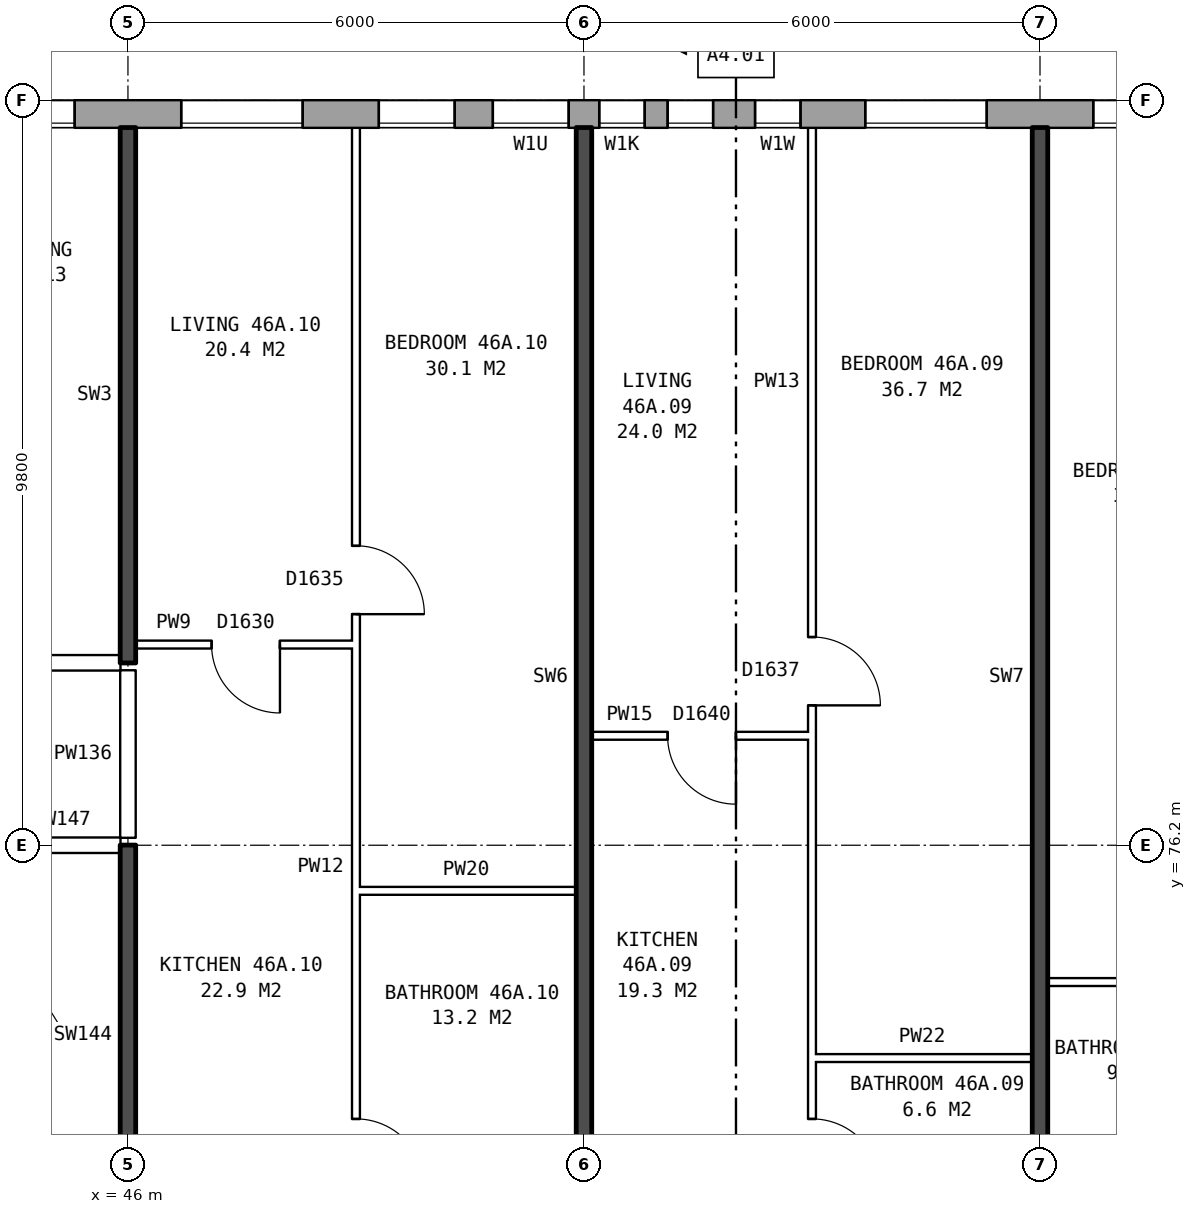
"""IFC4 building model, lengths in metres.
Left out: names, types, materials, properties, quantities, classifications, styles, units other than length and angle.
Written with IfcOpenShell. Run it as: python <this file> out.ifc"""

import sys

from ifc_helpers import new_model, si_unit, direction, frame, frame_2d, origin, place, context, subcontext, project, spatial, rectangle, extrude, element, fill, save


model = new_model("IFC4")
c1 = context("Model", 3, precision=1e-05, world=origin(), true_north=direction((0.0, 1.0)))
c2 = subcontext(c1, "Body", "Model", "MODEL_VIEW")
j1 = project(units=[si_unit("LENGTHUNIT", "METRE"), si_unit("PLANEANGLEUNIT", "RADIAN")], contexts=[c1])
p1 = place(None, origin())
s1 = spatial("IfcSite", under=j1, at=p1, CompositionType="ELEMENT")
p2 = place(p1, origin())
s2 = spatial("IfcBuilding", under=s1, at=p2, CompositionType="ELEMENT")
p3 = place(p2, frame((0.0, 0.0, 164.0)))
s3 = spatial("IfcBuildingStorey", under=s2, at=p3, CompositionType="ELEMENT", Elevation=164.0)
p4 = place(p3, frame((72.925, 85.82, 0.0), z_axis=(0.0, 0.0, 1.0), x_axis=(-1.0, 0.0, 0.0)))
e1 = element("IfcWall", 1, at=p4, inside=s3, PredefinedType="STANDARD", context=c2, shape_type="SweptSolid", body=[
    extrude(rectangle(XDim=41.351, YDim=0.36, at=frame_2d((20.675, 0.0))), origin(), (0.0, 0.0, 1.0), 2.85),
])
p5 = place(p4, frame((0.625, 0.0, 0.8)))
e2 = element("IfcOpeningElement", 2, at=p5, cuts=e1, PredefinedType="OPENING", context=c2, shape_type="SweptSolid", body=[
    extrude(rectangle(XDim=1.6, YDim=1.8, at=frame_2d((0.8, 0.9))), frame((0.0, 0.19, 0.0), z_axis=(0.0, -1.0, 0.0), x_axis=(1.0, 0.0, 0.0)), (0.0, 0.0, 1.0), 0.38),
])
p6 = place(p4, frame((3.625, 0.0, 0.8)))
e3 = element("IfcOpeningElement", 3, at=p6, cuts=e1, PredefinedType="OPENING", context=c2, shape_type="SweptSolid", body=[
    extrude(rectangle(XDim=1.6, YDim=1.8, at=frame_2d((0.8, 0.9))), frame((0.0, 0.19, 0.0), z_axis=(0.0, -1.0, 0.0), x_axis=(1.0, 0.0, 0.0)), (0.0, 0.0, 1.0), 0.38),
])
p7 = place(p4, frame((6.625, 0.0, 0.8)))
e4 = element("IfcOpeningElement", 4, at=p7, cuts=e1, PredefinedType="OPENING", context=c2, shape_type="SweptSolid", body=[
    extrude(rectangle(XDim=1.6, YDim=1.8, at=frame_2d((0.8, 0.9))), frame((0.0, 0.19, 0.0), z_axis=(0.0, -1.0, 0.0), x_axis=(1.0, 0.0, 0.0)), (0.0, 0.0, 1.0), 0.38),
])
p8 = place(p4, frame((9.625, 0.0, 0.8)))
e5 = element("IfcOpeningElement", 5, at=p8, cuts=e1, PredefinedType="OPENING", context=c2, shape_type="SweptSolid", body=[
    extrude(rectangle(XDim=1.6, YDim=1.8, at=frame_2d((0.8, 0.9))), frame((0.0, 0.19, 0.0), z_axis=(0.0, -1.0, 0.0), x_axis=(1.0, 0.0, 0.0)), (0.0, 0.0, 1.0), 0.38),
])
p9 = place(p4, frame((12.625, 0.0, 0.8)))
e6 = element("IfcOpeningElement", 6, at=p9, cuts=e1, PredefinedType="OPENING", context=c2, shape_type="SweptSolid", body=[
    extrude(rectangle(XDim=1.6, YDim=1.8, at=frame_2d((0.8, 0.9))), frame((0.0, 0.19, 0.0), z_axis=(0.0, -1.0, 0.0), x_axis=(1.0, 0.0, 0.0)), (0.0, 0.0, 1.0), 0.38),
])
p10 = place(p4, frame((15.625, 0.0, 0.8)))
e7 = element("IfcOpeningElement", 7, at=p10, cuts=e1, PredefinedType="OPENING", context=c2, shape_type="SweptSolid", body=[
    extrude(rectangle(XDim=1.6, YDim=1.8, at=frame_2d((0.8, 0.9))), frame((0.0, 0.19, 0.0), z_axis=(0.0, -1.0, 0.0), x_axis=(1.0, 0.0, 0.0)), (0.0, 0.0, 1.0), 0.38),
])
p11 = place(p4, frame((18.075, 0.0, 1.65)))
e8 = element("IfcOpeningElement", 8, at=p11, cuts=e1, PredefinedType="OPENING", context=c2, shape_type="SweptSolid", body=[
    extrude(rectangle(XDim=0.6, YDim=0.9, at=frame_2d((0.3, 0.45))), frame((0.0, 0.19, 0.0), z_axis=(0.0, -1.0, 0.0), x_axis=(1.0, 0.0, 0.0)), (0.0, 0.0, 1.0), 0.38),
])
p12 = place(p4, frame((21.125, 0.0, 0.15)))
e9 = element("IfcOpeningElement", 9, at=p12, cuts=e1, PredefinedType="OPENING", context=c2, shape_type="SweptSolid", body=[
    extrude(rectangle(XDim=1.0, YDim=0.9, at=frame_2d((0.5, 0.45))), frame((0.0, 0.19, 0.0), z_axis=(0.0, -1.0, 0.0), x_axis=(1.0, 0.0, 0.0)), (0.0, 0.0, 1.0), 0.38),
])
p13 = place(p4, frame((24.625, 0.0, 0.8)))
e10 = element("IfcOpeningElement", 10, at=p13, cuts=e1, PredefinedType="OPENING", context=c2, shape_type="SweptSolid", body=[
    extrude(rectangle(XDim=1.6, YDim=1.8, at=frame_2d((0.8, 0.9))), frame((0.0, 0.19, 0.0), z_axis=(0.0, -1.0, 0.0), x_axis=(1.0, 0.0, 0.0)), (0.0, 0.0, 1.0), 0.38),
])
p14 = place(p4, frame((27.625, 0.0, 0.8)))
e11 = element("IfcOpeningElement", 11, at=p14, cuts=e1, PredefinedType="OPENING", context=c2, shape_type="SweptSolid", body=[
    extrude(rectangle(XDim=1.6, YDim=1.8, at=frame_2d((0.8, 0.9))), frame((0.0, 0.19, 0.0), z_axis=(0.0, -1.0, 0.0), x_axis=(1.0, 0.0, 0.0)), (0.0, 0.0, 1.0), 0.38),
])
p15 = place(p4, frame((30.625, 0.0, 0.8)))
e12 = element("IfcOpeningElement", 12, at=p15, cuts=e1, PredefinedType="OPENING", context=c2, shape_type="SweptSolid", body=[
    extrude(rectangle(XDim=1.6, YDim=1.8, at=frame_2d((0.8, 0.9))), frame((0.0, 0.19, 0.0), z_axis=(0.0, -1.0, 0.0), x_axis=(1.0, 0.0, 0.0)), (0.0, 0.0, 1.0), 0.38),
])
p16 = place(p4, frame((33.625, 0.0, 0.8)))
e13 = element("IfcOpeningElement", 13, at=p16, cuts=e1, PredefinedType="OPENING", context=c2, shape_type="SweptSolid", body=[
    extrude(rectangle(XDim=1.6, YDim=1.8, at=frame_2d((0.8, 0.9))), frame((0.0, 0.19, 0.0), z_axis=(0.0, -1.0, 0.0), x_axis=(1.0, 0.0, 0.0)), (0.0, 0.0, 1.0), 0.38),
])
p17 = place(p4, frame((36.625, 0.0, 0.8)))
e14 = element("IfcOpeningElement", 14, at=p17, cuts=e1, PredefinedType="OPENING", context=c2, shape_type="SweptSolid", body=[
    extrude(rectangle(XDim=1.6, YDim=1.8, at=frame_2d((0.8, 0.9))), frame((0.0, 0.19, 0.0), z_axis=(0.0, -1.0, 0.0), x_axis=(1.0, 0.0, 0.0)), (0.0, 0.0, 1.0), 0.38),
])
p18 = place(p4, frame((19.225, 0.0, 0.15)))
e15 = element("IfcOpeningElement", 15, at=p18, cuts=e1, PredefinedType="OPENING", context=c2, shape_type="SweptSolid", body=[
    extrude(rectangle(XDim=0.6, YDim=0.9, at=frame_2d((0.3, 0.45))), frame((0.0, 0.19, 0.0), z_axis=(0.0, -1.0, 0.0), x_axis=(1.0, 0.0, 0.0)), (0.0, 0.0, 1.0), 0.38),
])
p19 = place(p4, frame((20.125, 0.0, 0.25)))
e16 = element("IfcOpeningElement", 16, at=p19, cuts=e1, PredefinedType="OPENING", context=c2, shape_type="SweptSolid", body=[
    extrude(rectangle(XDim=0.6, YDim=1.5, at=frame_2d((0.3, 0.75))), frame((0.0, 0.19, 0.0), z_axis=(0.0, -1.0, 0.0), x_axis=(1.0, 0.0, 0.0)), (0.0, 0.0, 1.0), 0.38),
])
p20 = place(p4, frame((22.625, 0.0, 1.65)))
e17 = element("IfcOpeningElement", 17, at=p20, cuts=e1, PredefinedType="OPENING", context=c2, shape_type="SweptSolid", body=[
    extrude(rectangle(XDim=1.0, YDim=0.9, at=frame_2d((0.5, 0.45))), frame((0.0, 0.19, 0.0), z_axis=(0.0, -1.0, 0.0), x_axis=(1.0, 0.0, 0.0)), (0.0, 0.0, 1.0), 0.38),
])
for number, where, z_axis, x_axis in (
    (18, (55.0, 73.4, 0.0), (0.0, 0.0, 1.0), (1.0, 0.0, 0.0)),
    (19, (58.1, 74.4, 0.0), (0.0, 0.0, 1.0), (1.0, 0.0, 0.0)),
    (20, (49.0, 75.6, 0.0), (0.0, 0.0, 1.0), (1.0, 0.0, 0.0)),
):
    element("IfcWall", number, at=place(p3, frame(where, z_axis=z_axis, x_axis=x_axis)), inside=s3, PredefinedType="PARTITIONING", context=c2, shape_type="SweptSolid", body=[
        extrude(rectangle(XDim=2.9, YDim=0.1, at=frame_2d((1.45, 0.0))), origin(), (0.0, 0.0, 1.0), 2.85),
    ])
p21 = place(p3, frame((44.36, 76.2, 0.0), z_axis=(0.0, 0.0, 1.0), x_axis=(1.0, 0.0, 0.0)))
e21 = element("IfcWall", 21, at=p21, inside=s3, PredefinedType="PARTITIONING", context=c2, shape_type="SweptSolid", body=[
    extrude(rectangle(XDim=1.54, YDim=0.2, at=frame_2d((0.77, 0.0))), origin(), (0.0, 0.0, 1.0), 2.85),
])
p22 = place(p3, frame((52.1, 77.64, 0.0), z_axis=(0.0, 0.0, 1.0), x_axis=(1.0, 0.0, 0.0)))
e22 = element("IfcWall", 22, at=p22, inside=s3, PredefinedType="PARTITIONING", context=c2, shape_type="SweptSolid", body=[
    extrude(rectangle(XDim=2.9, YDim=0.1, at=frame_2d((1.45, 0.0))), origin(), (0.0, 0.0, 1.0), 2.85),
])
p23 = place(p22, frame((1.0, 0.0, 0.0)))
e23 = element("IfcOpeningElement", 23, at=p23, cuts=e22, PredefinedType="OPENING", context=c2, shape_type="SweptSolid", body=[
    extrude(rectangle(XDim=0.9, YDim=2.1, at=frame_2d((0.45, 1.05))), frame((0.0, 0.06, 0.0), z_axis=(0.0, -1.0, 0.0), x_axis=(1.0, 0.0, 0.0)), (0.0, 0.0, 1.0), 0.12),
])
p24 = place(p3, frame((28.86, 78.6, 0.0), z_axis=(0.0, 0.0, 1.0), x_axis=(1.0, 0.0, 0.0)))
e24 = element("IfcWall", 24, at=p24, inside=s3, PredefinedType="PARTITIONING", context=c2, shape_type="SweptSolid", body=[
    extrude(rectangle(XDim=17.04, YDim=0.2, at=frame_2d((8.52, 0.0))), origin(), (0.0, 0.0, 1.0), 2.85),
])
p25 = place(p24, frame((14.59, 0.0, 0.0)))
e25 = element("IfcOpeningElement", 25, at=p25, cuts=e24, PredefinedType="OPENING", context=c2, shape_type="SweptSolid", body=[
    extrude(rectangle(XDim=1.0, YDim=2.1, at=frame_2d((0.5, 1.05))), frame((0.0, 0.11, 0.0), z_axis=(0.0, -1.0, 0.0), x_axis=(1.0, 0.0, 0.0)), (0.0, 0.0, 1.0), 0.22),
])
p26 = place(p24, frame((7.64, 0.0, 0.0)))
e26 = element("IfcOpeningElement", 26, at=p26, cuts=e24, PredefinedType="OPENING", context=c2, shape_type="SweptSolid", body=[
    extrude(rectangle(XDim=1.0, YDim=2.1, at=frame_2d((0.5, 1.05))), frame((0.0, 0.11, 0.0), z_axis=(0.0, -1.0, 0.0), x_axis=(1.0, 0.0, 0.0)), (0.0, 0.0, 1.0), 0.22),
])
p27 = place(p3, frame((46.1, 78.84, 0.0), z_axis=(0.0, 0.0, 1.0), x_axis=(1.0, 0.0, 0.0)))
e27 = element("IfcWall", 27, at=p27, inside=s3, PredefinedType="PARTITIONING", context=c2, shape_type="SweptSolid", body=[
    extrude(rectangle(XDim=2.9, YDim=0.1, at=frame_2d((1.45, 0.0))), origin(), (0.0, 0.0, 1.0), 2.85),
])
p28 = place(p27, frame((1.0, 0.0, 0.0)))
e28 = element("IfcOpeningElement", 28, at=p28, cuts=e27, PredefinedType="OPENING", context=c2, shape_type="SweptSolid", body=[
    extrude(rectangle(XDim=0.9, YDim=2.1, at=frame_2d((0.45, 1.05))), frame((0.0, 0.06, 0.0), z_axis=(0.0, -1.0, 0.0), x_axis=(1.0, 0.0, 0.0)), (0.0, 0.0, 1.0), 0.12),
])
p29 = place(p3, frame((46.0, 71.2, 0.0), z_axis=(0.0, 0.0, 1.0), x_axis=(0.0, 1.0, 0.0)))
e29 = element("IfcWall", 29, at=p29, inside=s3, PredefinedType="SOLIDWALL", context=c2, shape_type="SweptSolid", body=[
    extrude(rectangle(XDim=5.0, YDim=0.2, at=frame_2d((2.5, 0.0))), origin(), (0.0, 0.0, 1.0), 2.85),
])
p30 = place(p3, frame((46.0, 76.3, 0.0), z_axis=(0.0, 0.0, 1.0), x_axis=(0.0, 1.0, 0.0)))
e30 = element("IfcWall", 30, at=p30, inside=s3, PredefinedType="PARTITIONING", context=c2, shape_type="SweptSolid", body=[
    extrude(rectangle(XDim=2.2, YDim=0.2, at=frame_2d((1.1, 0.0))), origin(), (0.0, 0.0, 1.0), 2.85),
])
p31 = place(p3, frame((46.0, 78.6, 0.0), z_axis=(0.0, 0.0, 1.0), x_axis=(0.0, 1.0, 0.0)))
e31 = element("IfcWall", 31, at=p31, inside=s3, PredefinedType="SOLIDWALL", context=c2, shape_type="SweptSolid", body=[
    extrude(rectangle(XDim=7.04, YDim=0.2, at=frame_2d((3.52, 0.0))), origin(), (0.0, 0.0, 1.0), 2.85),
])
p32 = place(p3, frame((49.0, 71.3, 0.0), z_axis=(0.0, 0.0, 1.0), x_axis=(0.0, 1.0, 0.0)))
e32 = element("IfcWall", 32, at=p32, inside=s3, PredefinedType="PARTITIONING", context=c2, shape_type="SweptSolid", body=[
    extrude(rectangle(XDim=14.34, YDim=0.1, at=frame_2d((7.17, 0.0))), origin(), (0.0, 0.0, 1.0), 2.85),
])
p33 = place(p32, frame((7.94, 0.0, 0.0)))
e33 = element("IfcOpeningElement", 33, at=p33, cuts=e32, PredefinedType="OPENING", context=c2, shape_type="SweptSolid", body=[
    extrude(rectangle(XDim=0.9, YDim=2.1, at=frame_2d((0.45, 1.05))), frame((0.0, 0.06, 0.0), z_axis=(0.0, -1.0, 0.0), x_axis=(1.0, 0.0, 0.0)), (0.0, 0.0, 1.0), 0.12),
])
p34 = place(p32, frame((0.4, 0.0, 0.0)))
e34 = element("IfcOpeningElement", 34, at=p34, cuts=e32, PredefinedType="OPENING", context=c2, shape_type="SweptSolid", body=[
    extrude(rectangle(XDim=0.9, YDim=2.1, at=frame_2d((0.45, 1.05))), frame((0.0, 0.06, 0.0), z_axis=(0.0, -1.0, 0.0), x_axis=(1.0, 0.0, 0.0)), (0.0, 0.0, 1.0), 0.12),
])
p35 = place(p3, frame((52.0, 71.2, 0.0), z_axis=(0.0, 0.0, 1.0), x_axis=(0.0, 1.0, 0.0)))
e35 = element("IfcWall", 35, at=p35, inside=s3, PredefinedType="SOLIDWALL", context=c2, shape_type="SweptSolid", body=[
    extrude(rectangle(XDim=14.44, YDim=0.2, at=frame_2d((7.22, 0.0))), origin(), (0.0, 0.0, 1.0), 2.85),
])
p36 = place(p3, frame((55.0, 71.3, 0.0), z_axis=(0.0, 0.0, 1.0), x_axis=(0.0, 1.0, 0.0)))
e36 = element("IfcWall", 36, at=p36, inside=s3, PredefinedType="PARTITIONING", context=c2, shape_type="SweptSolid", body=[
    extrude(rectangle(XDim=14.34, YDim=0.1, at=frame_2d((7.17, 0.0))), origin(), (0.0, 0.0, 1.0), 2.85),
])
p37 = place(p36, frame((6.74, 0.0, 0.0)))
e37 = element("IfcOpeningElement", 37, at=p37, cuts=e36, PredefinedType="OPENING", context=c2, shape_type="SweptSolid", body=[
    extrude(rectangle(XDim=0.9, YDim=2.1, at=frame_2d((0.45, 1.05))), frame((0.0, 0.06, 0.0), z_axis=(0.0, -1.0, 0.0), x_axis=(1.0, 0.0, 0.0)), (0.0, 0.0, 1.0), 0.12),
])
p38 = place(p36, frame((0.4, 0.0, 0.0)))
e38 = element("IfcOpeningElement", 38, at=p38, cuts=e36, PredefinedType="OPENING", context=c2, shape_type="SweptSolid", body=[
    extrude(rectangle(XDim=0.9, YDim=2.1, at=frame_2d((0.45, 1.05))), frame((0.0, 0.06, 0.0), z_axis=(0.0, -1.0, 0.0), x_axis=(1.0, 0.0, 0.0)), (0.0, 0.0, 1.0), 0.12),
])
p39 = place(p3, frame((58.0, 71.2, 0.0), z_axis=(0.0, 0.0, 1.0), x_axis=(0.0, 1.0, 0.0)))
e39 = element("IfcWall", 39, at=p39, inside=s3, PredefinedType="SOLIDWALL", context=c2, shape_type="SweptSolid", body=[
    extrude(rectangle(XDim=14.44, YDim=0.2, at=frame_2d((7.22, 0.0))), origin(), (0.0, 0.0, 1.0), 2.85),
])
p40 = place(p9, origin())
e40 = element("IfcWindow", 40, at=p40, inside=s3, PartitioningType="SINGLE_PANEL", PredefinedType="WINDOW", context=c2, shape_type="SweptSolid", body=[
    extrude(rectangle(XDim=1.6, YDim=1.8, at=frame_2d((0.8, 0.9))), frame((0.0, 0.15, 0.0), z_axis=(0.0, -1.0, 0.0), x_axis=(1.0, 0.0, 0.0)), (0.0, 0.0, 1.0), 0.06),
])
fill(e6, e40)
p41 = place(p10, origin())
e41 = element("IfcWindow", 41, at=p41, inside=s3, PartitioningType="SINGLE_PANEL", PredefinedType="WINDOW", context=c2, shape_type="SweptSolid", body=[
    extrude(rectangle(XDim=1.6, YDim=1.8, at=frame_2d((0.8, 0.9))), frame((0.0, 0.15, 0.0), z_axis=(0.0, -1.0, 0.0), x_axis=(1.0, 0.0, 0.0)), (0.0, 0.0, 1.0), 0.06),
])
fill(e7, e41)
p42 = place(p11, origin())
e42 = element("IfcWindow", 42, at=p42, inside=s3, PartitioningType="SINGLE_PANEL", PredefinedType="WINDOW", context=c2, shape_type="SweptSolid", body=[
    extrude(rectangle(XDim=0.6, YDim=0.9, at=frame_2d((0.3, 0.45))), frame((0.0, 0.15, 0.0), z_axis=(0.0, -1.0, 0.0), x_axis=(1.0, 0.0, 0.0)), (0.0, 0.0, 1.0), 0.06),
])
fill(e8, e42)
p43 = place(p12, origin())
e43 = element("IfcWindow", 43, at=p43, inside=s3, PartitioningType="SINGLE_PANEL", PredefinedType="WINDOW", context=c2, shape_type="SweptSolid", body=[
    extrude(rectangle(XDim=1.0, YDim=0.9, at=frame_2d((0.5, 0.45))), frame((0.0, 0.15, 0.0), z_axis=(0.0, -1.0, 0.0), x_axis=(1.0, 0.0, 0.0)), (0.0, 0.0, 1.0), 0.06),
])
fill(e9, e43)
p44 = place(p13, origin())
e44 = element("IfcWindow", 44, at=p44, inside=s3, PartitioningType="SINGLE_PANEL", PredefinedType="WINDOW", context=c2, shape_type="SweptSolid", body=[
    extrude(rectangle(XDim=1.6, YDim=1.8, at=frame_2d((0.8, 0.9))), frame((0.0, 0.15, 0.0), z_axis=(0.0, -1.0, 0.0), x_axis=(1.0, 0.0, 0.0)), (0.0, 0.0, 1.0), 0.06),
])
fill(e10, e44)
p45 = place(p14, origin())
e45 = element("IfcWindow", 45, at=p45, inside=s3, PartitioningType="SINGLE_PANEL", PredefinedType="WINDOW", context=c2, shape_type="SweptSolid", body=[
    extrude(rectangle(XDim=1.6, YDim=1.8, at=frame_2d((0.8, 0.9))), frame((0.0, 0.15, 0.0), z_axis=(0.0, -1.0, 0.0), x_axis=(1.0, 0.0, 0.0)), (0.0, 0.0, 1.0), 0.06),
])
fill(e11, e45)
p46 = place(p37, frame((0.9, 0.0, 0.0), z_axis=(0.0, 0.0, 1.0), x_axis=(-1.0, 0.0, 0.0)))
e46 = element("IfcDoor", 46, at=p46, inside=s3, OperationType="SINGLE_SWING_RIGHT", PredefinedType="DOOR", context=c2, shape_type="SweptSolid", body=[
    extrude(rectangle(XDim=0.9, YDim=2.1, at=frame_2d((0.45, 1.05))), frame((0.0, 0.025, 0.0), z_axis=(0.0, -1.0, 0.0), x_axis=(1.0, 0.0, 0.0)), (0.0, 0.0, 1.0), 0.05),
])
fill(e37, e46)
p47 = place(p23, frame((0.9, 0.0, 0.0), z_axis=(0.0, 0.0, 1.0), x_axis=(-1.0, 0.0, 0.0)))
e47 = element("IfcDoor", 47, at=p47, inside=s3, OperationType="SINGLE_SWING_LEFT", PredefinedType="DOOR", context=c2, shape_type="SweptSolid", body=[
    extrude(rectangle(XDim=0.9, YDim=2.1, at=frame_2d((0.45, 1.05))), frame((0.0, 0.025, 0.0), z_axis=(0.0, -1.0, 0.0), x_axis=(1.0, 0.0, 0.0)), (0.0, 0.0, 1.0), 0.05),
])
fill(e23, e47)
p48 = place(p38, frame((0.9, 0.0, 0.0), z_axis=(0.0, 0.0, 1.0), x_axis=(-1.0, 0.0, 0.0)))
e48 = element("IfcDoor", 48, at=p48, inside=s3, OperationType="SINGLE_SWING_RIGHT", PredefinedType="DOOR", context=c2, shape_type="SweptSolid", body=[
    extrude(rectangle(XDim=0.9, YDim=2.1, at=frame_2d((0.45, 1.05))), frame((0.0, 0.025, 0.0), z_axis=(0.0, -1.0, 0.0), x_axis=(1.0, 0.0, 0.0)), (0.0, 0.0, 1.0), 0.05),
])
fill(e38, e48)
p49 = place(p33, frame((0.9, 0.0, 0.0), z_axis=(0.0, 0.0, 1.0), x_axis=(-1.0, 0.0, 0.0)))
e49 = element("IfcDoor", 49, at=p49, inside=s3, OperationType="SINGLE_SWING_RIGHT", PredefinedType="DOOR", context=c2, shape_type="SweptSolid", body=[
    extrude(rectangle(XDim=0.9, YDim=2.1, at=frame_2d((0.45, 1.05))), frame((0.0, 0.025, 0.0), z_axis=(0.0, -1.0, 0.0), x_axis=(1.0, 0.0, 0.0)), (0.0, 0.0, 1.0), 0.05),
])
fill(e33, e49)
p50 = place(p28, frame((0.9, 0.0, 0.0), z_axis=(0.0, 0.0, 1.0), x_axis=(-1.0, 0.0, 0.0)))
e50 = element("IfcDoor", 50, at=p50, inside=s3, OperationType="SINGLE_SWING_LEFT", PredefinedType="DOOR", context=c2, shape_type="SweptSolid", body=[
    extrude(rectangle(XDim=0.9, YDim=2.1, at=frame_2d((0.45, 1.05))), frame((0.0, 0.025, 0.0), z_axis=(0.0, -1.0, 0.0), x_axis=(1.0, 0.0, 0.0)), (0.0, 0.0, 1.0), 0.05),
])
fill(e28, e50)
p51 = place(p34, frame((0.9, 0.0, 0.0), z_axis=(0.0, 0.0, 1.0), x_axis=(-1.0, 0.0, 0.0)))
e51 = element("IfcDoor", 51, at=p51, inside=s3, OperationType="SINGLE_SWING_RIGHT", PredefinedType="DOOR", context=c2, shape_type="SweptSolid", body=[
    extrude(rectangle(XDim=0.9, YDim=2.1, at=frame_2d((0.45, 1.05))), frame((0.0, 0.025, 0.0), z_axis=(0.0, -1.0, 0.0), x_axis=(1.0, 0.0, 0.0)), (0.0, 0.0, 1.0), 0.05),
])
fill(e34, e51)
p52 = place(p18, origin())
e52 = element("IfcWindow", 52, at=p52, inside=s3, PartitioningType="SINGLE_PANEL", PredefinedType="WINDOW", context=c2, shape_type="SweptSolid", body=[
    extrude(rectangle(XDim=0.6, YDim=0.9, at=frame_2d((0.3, 0.45))), frame((0.0, 0.15, 0.0), z_axis=(0.0, -1.0, 0.0), x_axis=(1.0, 0.0, 0.0)), (0.0, 0.0, 1.0), 0.06),
])
fill(e15, e52)
p53 = place(p19, origin())
e53 = element("IfcWindow", 53, at=p53, inside=s3, PartitioningType="SINGLE_PANEL", PredefinedType="WINDOW", context=c2, shape_type="SweptSolid", body=[
    extrude(rectangle(XDim=0.6, YDim=1.5, at=frame_2d((0.3, 0.75))), frame((0.0, 0.15, 0.0), z_axis=(0.0, -1.0, 0.0), x_axis=(1.0, 0.0, 0.0)), (0.0, 0.0, 1.0), 0.06),
])
fill(e16, e53)
p54 = place(p20, origin())
e54 = element("IfcWindow", 54, at=p54, inside=s3, PartitioningType="SINGLE_PANEL", PredefinedType="WINDOW", context=c2, shape_type="SweptSolid", body=[
    extrude(rectangle(XDim=1.0, YDim=0.9, at=frame_2d((0.5, 0.45))), frame((0.0, 0.15, 0.0), z_axis=(0.0, -1.0, 0.0), x_axis=(1.0, 0.0, 0.0)), (0.0, 0.0, 1.0), 0.06),
])
fill(e17, e54)
save(model, sys.argv[1])
